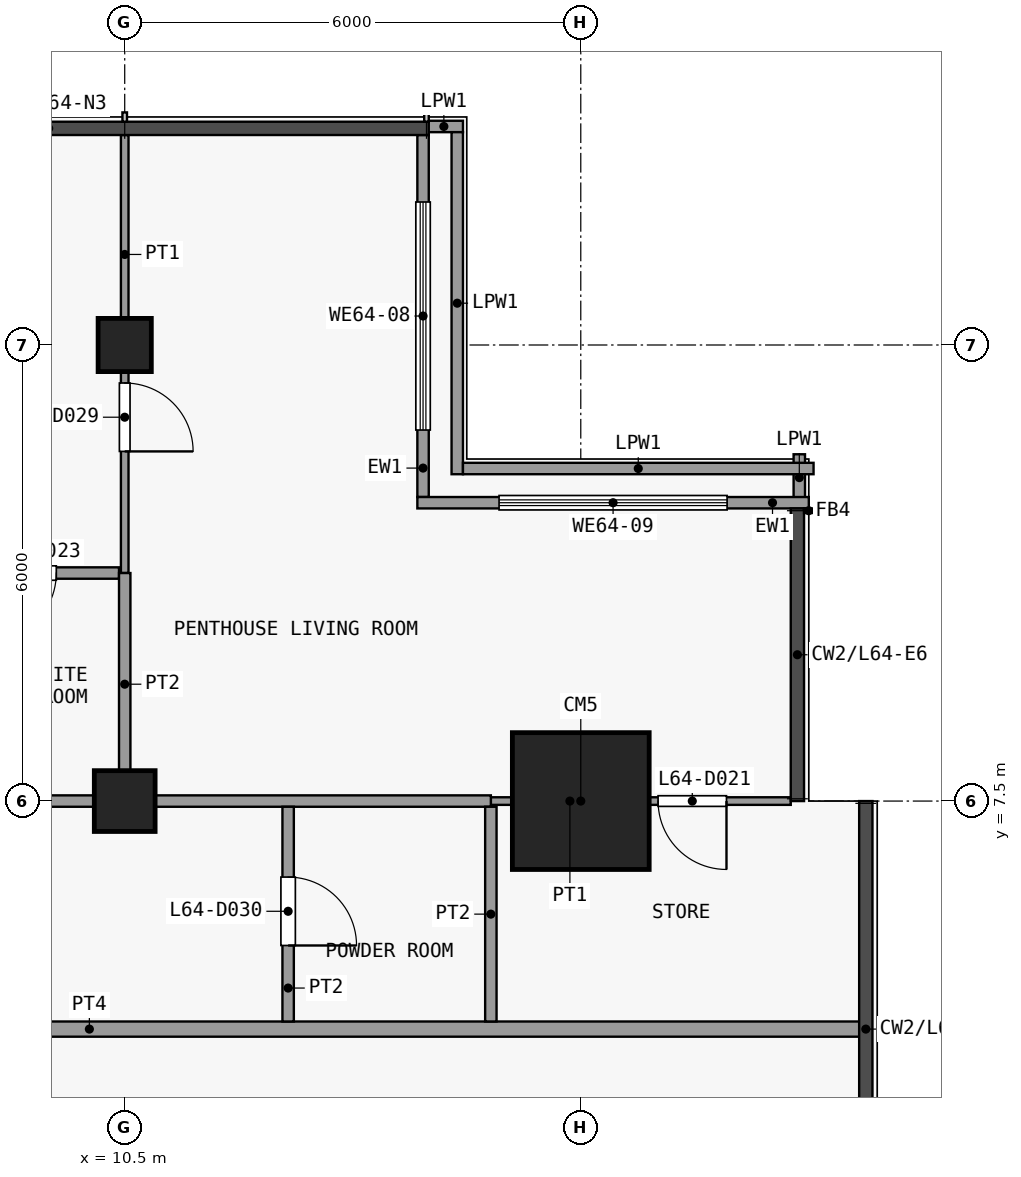
"""IFC4 building model, lengths in metres.
Left out: names, types, materials, properties, quantities, classifications, styles, units other than length and angle.
Written with IfcOpenShell. Run it as: python <this file> out.ifc"""

import sys

from ifc_helpers import new_model, si_unit, direction, frame, frame_2d, origin, origin_2d, place, context, subcontext, project, spatial, rectangle, extrude, element, fill, save


model = new_model("IFC4")
c1 = context("Model", 3, precision=1e-05, world=origin(), true_north=direction((0.0, 1.0)))
c2 = subcontext(c1, "Body", "Model", "MODEL_VIEW")
j1 = project(units=[si_unit("LENGTHUNIT", "METRE"), si_unit("PLANEANGLEUNIT", "RADIAN")], contexts=[c1])
p1 = place(None, origin())
s1 = spatial("IfcSite", under=j1, at=p1, CompositionType="ELEMENT")
p2 = place(p1, origin())
s2 = spatial("IfcBuilding", under=s1, at=p2, CompositionType="ELEMENT")
p3 = place(p2, frame((0.0, 0.0, 255.5)))
s3 = spatial("IfcBuildingStorey", under=s2, at=p3, CompositionType="ELEMENT", Elevation=255.5)
p4 = place(p3, frame((10.5, 7.5, 0.0), z_axis=(0.0, 0.0, 1.0), x_axis=(1.0, 0.0, 0.0)))
e1 = element("IfcColumn", 1, at=p4, inside=s3, PredefinedType="COLUMN", context=c2, shape_type="SweptSolid", body=[
    extrude(rectangle(XDim=0.8, YDim=0.8, at=origin_2d()), origin(), (0.0, 0.0, 1.0), 3.6),
])
p5 = place(p3, frame((10.5, 13.5, 0.0), z_axis=(0.0, 0.0, 1.0), x_axis=(1.0, 0.0, 0.0)))
e2 = element("IfcColumn", 2, at=p5, inside=s3, PredefinedType="COLUMN", context=c2, shape_type="SweptSolid", body=[
    extrude(rectangle(XDim=0.7, YDim=0.7, at=origin_2d()), origin(), (0.0, 0.0, 1.0), 3.6),
])
p6 = place(p3, frame((16.5, 7.5, 0.0), z_axis=(0.0, 0.0, 1.0), x_axis=(1.0, 0.0, 0.0)))
e3 = element("IfcColumn", 3, at=p6, inside=s3, PredefinedType="COLUMN", context=c2, shape_type="SweptSolid", body=[
    extrude(rectangle(XDim=1.8, YDim=1.8, at=origin_2d()), origin(), (0.0, 0.0, 1.0), 3.6),
])
p7 = place(p3, frame((14.425, 16.262, 0.0), z_axis=(0.0, 0.0, 1.0), x_axis=(0.0, -1.0, 0.0)))
e4 = element("IfcWall", 4, at=p7, inside=s3, PredefinedType="SOLIDWALL", context=c2, shape_type="SweptSolid", body=[
    extrude(rectangle(XDim=4.762, YDim=0.15, at=frame_2d((2.381, 0.0))), origin(), (0.0, 0.0, 1.0), 3.3),
])
p8 = place(p7, frame((0.881, 0.0, 0.9)))
e5 = element("IfcOpeningElement", 5, at=p8, cuts=e4, PredefinedType="OPENING", context=c2, shape_type="SweptSolid", body=[
    extrude(rectangle(XDim=3.0, YDim=2.4, at=frame_2d((1.5, 1.2))), frame((0.0, 0.085, 0.0), z_axis=(0.0, -1.0, 0.0), x_axis=(1.0, 0.0, 0.0)), (0.0, 0.0, 1.0), 0.17),
])
p9 = place(p3, frame((14.35, 11.425, 0.0), z_axis=(0.0, 0.0, 1.0), x_axis=(1.0, 0.0, 0.0)))
e6 = element("IfcWall", 6, at=p9, inside=s3, PredefinedType="SOLIDWALL", context=c2, shape_type="SweptSolid", body=[
    extrude(rectangle(XDim=5.15, YDim=0.15, at=frame_2d((2.575, 0.0))), origin(), (0.0, 0.0, 1.0), 3.3),
])
p10 = place(p9, frame((1.075, 0.0, 0.9)))
e7 = element("IfcOpeningElement", 7, at=p10, cuts=e6, PredefinedType="OPENING", context=c2, shape_type="SweptSolid", body=[
    extrude(rectangle(XDim=3.0, YDim=2.4, at=frame_2d((1.5, 1.2))), frame((0.0, 0.085, 0.0), z_axis=(0.0, -1.0, 0.0), x_axis=(1.0, 0.0, 0.0)), (0.0, 0.0, 1.0), 0.17),
])
p11 = place(p3, frame((19.375, 12.062, 0.0), z_axis=(0.0, 0.0, 1.0), x_axis=(0.0, -1.0, 0.0)))
e8 = element("IfcWall", 8, at=p11, inside=s3, PredefinedType="PARAPET", context=c2, shape_type="SweptSolid", body=[
    extrude(rectangle(XDim=0.615, YDim=0.15, at=frame_2d((0.308, 0.0))), origin(), (0.0, 0.0, 1.0), 1.15),
])
p12 = place(p3, frame((14.448, 16.375, 0.0), z_axis=(0.0, 0.0, 1.0), x_axis=(1.0, 0.0, 0.0)))
e9 = element("IfcWall", 9, at=p12, inside=s3, PredefinedType="PARAPET", context=c2, shape_type="SweptSolid", body=[
    extrude(rectangle(XDim=0.502, YDim=0.15, at=frame_2d((0.251, 0.0))), origin(), (0.0, 0.0, 1.0), 1.15),
])
p13 = place(p3, frame((14.875, 16.3, 0.0), z_axis=(0.0, 0.0, 1.0), x_axis=(0.0, -1.0, 0.0)))
e10 = element("IfcWall", 10, at=p13, inside=s3, PredefinedType="PARAPET", context=c2, shape_type="SweptSolid", body=[
    extrude(rectangle(XDim=4.5, YDim=0.15, at=frame_2d((2.25, 0.0))), origin(), (0.0, 0.0, 1.0), 1.15),
])
p14 = place(p3, frame((14.95, 11.875, 0.0), z_axis=(0.0, 0.0, 1.0), x_axis=(1.0, 0.0, 0.0)))
e11 = element("IfcWall", 11, at=p14, inside=s3, PredefinedType="PARAPET", context=c2, shape_type="SweptSolid", body=[
    extrude(rectangle(XDim=4.613, YDim=0.15, at=frame_2d((2.306, 0.0))), origin(), (0.0, 0.0, 1.0), 1.15),
])
p15 = place(p3, frame((-19.35, 4.5, 0.0), z_axis=(0.0, 0.0, 1.0), x_axis=(1.0, 0.0, 0.0)))
e12 = element("IfcWall", 12, at=p15, inside=s3, PredefinedType="PARTITIONING", context=c2, shape_type="SweptSolid", body=[
    extrude(rectangle(XDim=39.6, YDim=0.2, at=frame_2d((19.8, 0.0))), origin(), (0.0, 0.0, 1.0), 3.3),
])
p16 = place(p15, frame((1.0, 0.0, 0.0)))
e13 = element("IfcOpeningElement", 13, at=p16, cuts=e12, PredefinedType="OPENING", context=c2, shape_type="SweptSolid", body=[
    extrude(rectangle(XDim=0.9, YDim=2.1, at=frame_2d((0.45, 1.05))), frame((0.0, 0.11, 0.0), z_axis=(0.0, -1.0, 0.0), x_axis=(1.0, 0.0, 0.0)), (0.0, 0.0, 1.0), 0.22),
])
p17 = place(p15, frame((5.35, 0.0, 0.0)))
e14 = element("IfcOpeningElement", 14, at=p17, cuts=e12, PredefinedType="OPENING", context=c2, shape_type="SweptSolid", body=[
    extrude(rectangle(XDim=0.9, YDim=2.1, at=frame_2d((0.45, 1.05))), frame((0.0, 0.11, 0.0), z_axis=(0.0, -1.0, 0.0), x_axis=(1.0, 0.0, 0.0)), (0.0, 0.0, 1.0), 0.22),
])
p18 = place(p15, frame((11.35, 0.0, 0.0)))
e15 = element("IfcOpeningElement", 15, at=p18, cuts=e12, PredefinedType="OPENING", context=c2, shape_type="SweptSolid", body=[
    extrude(rectangle(XDim=0.9, YDim=2.1, at=frame_2d((0.45, 1.05))), frame((0.0, 0.11, 0.0), z_axis=(0.0, -1.0, 0.0), x_axis=(1.0, 0.0, 0.0)), (0.0, 0.0, 1.0), 0.22),
])
p19 = place(p15, frame((18.05, 0.0, 0.0)))
e16 = element("IfcOpeningElement", 16, at=p19, cuts=e12, PredefinedType="OPENING", context=c2, shape_type="SweptSolid", body=[
    extrude(rectangle(XDim=1.0, YDim=2.1, at=frame_2d((0.5, 1.05))), frame((0.0, 0.11, 0.0), z_axis=(0.0, -1.0, 0.0), x_axis=(1.0, 0.0, 0.0)), (0.0, 0.0, 1.0), 0.22),
])
p20 = place(p3, frame((15.317, 7.5, 0.0), z_axis=(0.0, 0.0, 1.0), x_axis=(1.0, 0.0, 0.0)))
e17 = element("IfcWall", 17, at=p20, inside=s3, PredefinedType="PARTITIONING", context=c2, shape_type="SweptSolid", body=[
    extrude(rectangle(XDim=3.946, YDim=0.1, at=frame_2d((1.973, 0.0))), origin(), (0.0, 0.0, 1.0), 3.3),
])
p21 = place(p20, frame((2.2, 0.0, 0.0)))
e18 = element("IfcOpeningElement", 18, at=p21, cuts=e17, PredefinedType="OPENING", context=c2, shape_type="SweptSolid", body=[
    extrude(rectangle(XDim=0.9, YDim=2.1, at=frame_2d((0.45, 1.05))), frame((0.0, 0.06, 0.0), z_axis=(0.0, -1.0, 0.0), x_axis=(1.0, 0.0, 0.0)), (0.0, 0.0, 1.0), 0.12),
])
p22 = place(p3, frame((0.4, 7.5, 0.0), z_axis=(0.0, 0.0, 1.0), x_axis=(1.0, 0.0, 0.0)))
e19 = element("IfcWall", 19, at=p22, inside=s3, PredefinedType="PARTITIONING", context=c2, shape_type="SweptSolid", body=[
    extrude(rectangle(XDim=14.917, YDim=0.15, at=frame_2d((7.458, 0.0))), origin(), (0.0, 0.0, 1.0), 3.3),
])
p23 = place(p3, frame((7.8, 10.5, 0.0), z_axis=(0.0, 0.0, 1.0), x_axis=(1.0, 0.0, 0.0)))
e20 = element("IfcWall", 20, at=p23, inside=s3, PredefinedType="PARTITIONING", context=c2, shape_type="SweptSolid", body=[
    extrude(rectangle(XDim=2.625, YDim=0.15, at=frame_2d((1.312, 0.0))), origin(), (0.0, 0.0, 1.0), 3.3),
])
p24 = place(p23, frame((0.9, 0.0, 0.0)))
e21 = element("IfcOpeningElement", 21, at=p24, cuts=e20, PredefinedType="OPENING", context=c2, shape_type="SweptSolid", body=[
    extrude(rectangle(XDim=0.9, YDim=2.1, at=frame_2d((0.45, 1.05))), frame((0.0, 0.085, 0.0), z_axis=(0.0, -1.0, 0.0), x_axis=(1.0, 0.0, 0.0)), (0.0, 0.0, 1.0), 0.17),
])
p25 = place(p3, frame((10.5, 10.5, 0.0), z_axis=(0.0, 0.0, 1.0), x_axis=(0.0, 1.0, 0.0)))
e22 = element("IfcWall", 22, at=p25, inside=s3, PredefinedType="PARTITIONING", context=c2, shape_type="SweptSolid", body=[
    extrude(rectangle(XDim=5.762, YDim=0.1, at=frame_2d((2.881, 0.0))), origin(), (0.0, 0.0, 1.0), 3.3),
])
p26 = place(p25, frame((1.6, 0.0, 0.0)))
e23 = element("IfcOpeningElement", 23, at=p26, cuts=e22, PredefinedType="OPENING", context=c2, shape_type="SweptSolid", body=[
    extrude(rectangle(XDim=0.9, YDim=2.1, at=frame_2d((0.45, 1.05))), frame((0.0, 0.06, 0.0), z_axis=(0.0, -1.0, 0.0), x_axis=(1.0, 0.0, 0.0)), (0.0, 0.0, 1.0), 0.12),
])
p27 = place(p3, frame((10.5, 7.575, 0.0), z_axis=(0.0, 0.0, 1.0), x_axis=(0.0, 1.0, 0.0)))
e24 = element("IfcWall", 24, at=p27, inside=s3, PredefinedType="PARTITIONING", context=c2, shape_type="SweptSolid", body=[
    extrude(rectangle(XDim=2.925, YDim=0.15, at=frame_2d((1.462, 0.0))), origin(), (0.0, 0.0, 1.0), 3.3),
])
p28 = place(p3, frame((12.65, 4.6, 0.0), z_axis=(0.0, 0.0, 1.0), x_axis=(0.0, 1.0, 0.0)))
e25 = element("IfcWall", 25, at=p28, inside=s3, PredefinedType="PARTITIONING", context=c2, shape_type="SweptSolid", body=[
    extrude(rectangle(XDim=2.825, YDim=0.15, at=frame_2d((1.413, 0.0))), origin(), (0.0, 0.0, 1.0), 3.3),
])
p29 = place(p28, frame((1.0, 0.0, 0.0)))
e26 = element("IfcOpeningElement", 26, at=p29, cuts=e25, PredefinedType="OPENING", context=c2, shape_type="SweptSolid", body=[
    extrude(rectangle(XDim=0.9, YDim=2.1, at=frame_2d((0.45, 1.05))), frame((0.0, 0.085, 0.0), z_axis=(0.0, -1.0, 0.0), x_axis=(1.0, 0.0, 0.0)), (0.0, 0.0, 1.0), 0.17),
])
p30 = place(p3, frame((15.317, 4.6, 0.0), z_axis=(0.0, 0.0, 1.0), x_axis=(0.0, 1.0, 0.0)))
e27 = element("IfcWall", 27, at=p30, inside=s3, PredefinedType="PARTITIONING", context=c2, shape_type="SweptSolid", body=[
    extrude(rectangle(XDim=2.825, YDim=0.15, at=frame_2d((1.413, 0.0))), origin(), (0.0, 0.0, 1.0), 3.3),
])
p31 = place(p8, origin())
e28 = element("IfcWindow", 28, at=p31, inside=s3, PartitioningType="SINGLE_PANEL", PredefinedType="WINDOW", context=c2, shape_type="SweptSolid", body=[
    extrude(rectangle(XDim=3.0, YDim=2.4, at=frame_2d((1.5, 1.2))), frame((0.0, 0.03, 0.0), z_axis=(0.0, -1.0, 0.0), x_axis=(1.0, 0.0, 0.0)), (0.0, 0.0, 1.0), 0.06),
])
fill(e5, e28)
p32 = place(p10, origin())
e29 = element("IfcWindow", 29, at=p32, inside=s3, PartitioningType="SINGLE_PANEL", PredefinedType="WINDOW", context=c2, shape_type="SweptSolid", body=[
    extrude(rectangle(XDim=3.0, YDim=2.4, at=frame_2d((1.5, 1.2))), frame((0.0, 0.03, 0.0), z_axis=(0.0, -1.0, 0.0), x_axis=(1.0, 0.0, 0.0)), (0.0, 0.0, 1.0), 0.06),
])
fill(e7, e29)
p33 = place(p21, origin())
e30 = element("IfcDoor", 30, at=p33, inside=s3, OperationType="SINGLE_SWING_RIGHT", PredefinedType="DOOR", context=c2, shape_type="SweptSolid", body=[
    extrude(rectangle(XDim=0.9, YDim=2.1, at=frame_2d((0.45, 1.05))), frame((0.0, 0.025, 0.0), z_axis=(0.0, -1.0, 0.0), x_axis=(1.0, 0.0, 0.0)), (0.0, 0.0, 1.0), 0.05),
])
fill(e18, e30)
p34 = place(p24, origin())
e31 = element("IfcDoor", 31, at=p34, inside=s3, OperationType="SINGLE_SWING_LEFT", PredefinedType="DOOR", context=c2, shape_type="SweptSolid", body=[
    extrude(rectangle(XDim=0.9, YDim=2.1, at=frame_2d((0.45, 1.05))), frame((0.0, 0.025, 0.0), z_axis=(0.0, -1.0, 0.0), x_axis=(1.0, 0.0, 0.0)), (0.0, 0.0, 1.0), 0.05),
])
fill(e21, e31)
p35 = place(p26, origin())
e32 = element("IfcDoor", 32, at=p35, inside=s3, OperationType="SINGLE_SWING_LEFT", PredefinedType="DOOR", context=c2, shape_type="SweptSolid", body=[
    extrude(rectangle(XDim=0.9, YDim=2.1, at=frame_2d((0.45, 1.05))), frame((0.0, 0.025, 0.0), z_axis=(0.0, -1.0, 0.0), x_axis=(1.0, 0.0, 0.0)), (0.0, 0.0, 1.0), 0.05),
])
fill(e23, e32)
p36 = place(p29, origin())
e33 = element("IfcDoor", 33, at=p36, inside=s3, OperationType="SINGLE_SWING_LEFT", PredefinedType="DOOR", context=c2, shape_type="SweptSolid", body=[
    extrude(rectangle(XDim=0.9, YDim=2.1, at=frame_2d((0.45, 1.05))), frame((0.0, 0.025, 0.0), z_axis=(0.0, -1.0, 0.0), x_axis=(1.0, 0.0, 0.0)), (0.0, 0.0, 1.0), 0.05),
])
fill(e26, e33)
save(model, sys.argv[1])
